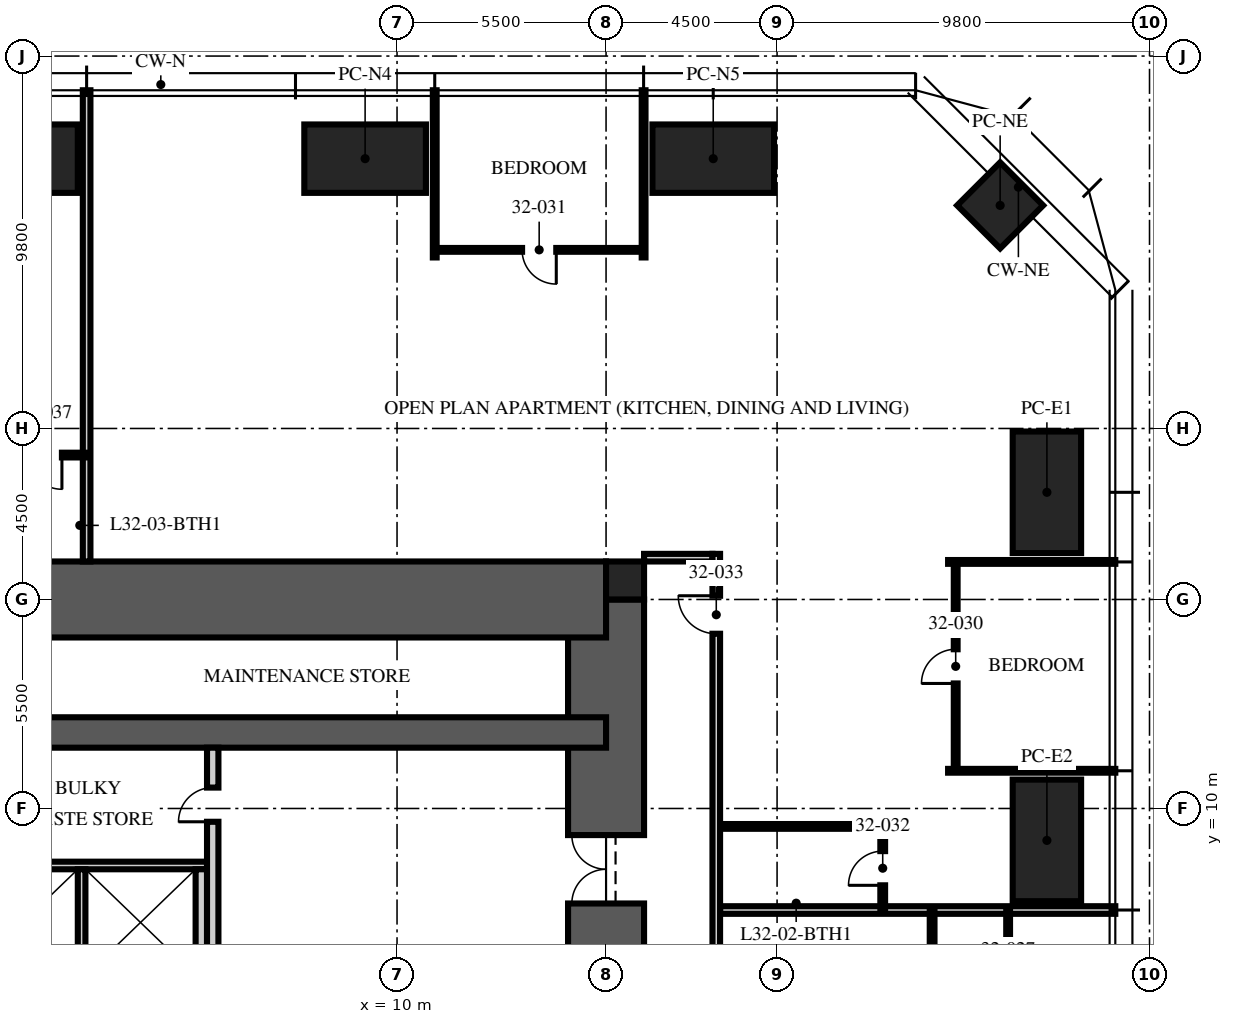
"""IFC4 building model, lengths in metres.
Left out: names, types, materials, properties, quantities, classifications, styles, units other than length and angle.
Written with IfcOpenShell. Run it as: python <this file> out.ifc"""

import sys

from ifc_helpers import new_model, si_unit, direction, frame, frame_2d, origin, origin_2d, place, context, subcontext, project, spatial, rectangle, extrude, element, fill, save


model = new_model("IFC4")
c1 = context("Model", 3, precision=1e-05, world=origin(), true_north=direction((0.0, 1.0)))
c2 = subcontext(c1, "Body", "Model", "MODEL_VIEW")
j1 = project(units=[si_unit("LENGTHUNIT", "METRE"), si_unit("PLANEANGLEUNIT", "RADIAN")], contexts=[c1])
p1 = place(None, origin())
s1 = spatial("IfcSite", under=j1, at=p1, CompositionType="ELEMENT")
p2 = place(p1, origin())
s2 = spatial("IfcBuilding", under=s1, at=p2, CompositionType="ELEMENT")
p3 = place(p2, frame((0.0, 0.0, 129.75)))
s3 = spatial("IfcBuildingStorey", under=s2, at=p3, CompositionType="ELEMENT", Elevation=129.75)
p4 = place(p3, frame((15.5, -15.5, -0.25), z_axis=(0.0, 0.0, 1.0), x_axis=(0.0, 1.0, 0.0)))
e1 = element("IfcWall", 1, at=p4, inside=s3, PredefinedType="SHEAR", context=c2, shape_type="SweptSolid", body=[
    extrude(rectangle(XDim=31.0, YDim=2.0, at=frame_2d((15.5, 0.0))), origin(), (0.0, 0.0, 1.0), 3.75),
])
p5 = place(p4, frame((6.5, 0.0, 0.25)))
e2 = element("IfcOpeningElement", 2, at=p5, cuts=e1, PredefinedType="OPENING", context=c2, shape_type="SweptSolid", body=[
    extrude(rectangle(XDim=1.2, YDim=2.1, at=frame_2d((0.6, 1.05))), frame((0.0, 1.01, 0.0), z_axis=(0.0, -1.0, 0.0), x_axis=(1.0, 0.0, 0.0)), (0.0, 0.0, 1.0), 2.02),
])
p6 = place(p4, frame((23.0, 0.0, 0.25)))
e3 = element("IfcOpeningElement", 3, at=p6, cuts=e1, PredefinedType="OPENING", context=c2, shape_type="SweptSolid", body=[
    extrude(rectangle(XDim=1.8, YDim=2.1, at=frame_2d((0.9, 1.05))), frame((0.0, 1.01, 0.0), z_axis=(0.0, -1.0, 0.0), x_axis=(1.0, 0.0, 0.0)), (0.0, 0.0, 1.0), 2.02),
])
p7 = place(p3, frame((-15.5, 15.5, -0.25), z_axis=(0.0, 0.0, 1.0), x_axis=(1.0, 0.0, 0.0)))
e4 = element("IfcWall", 4, at=p7, inside=s3, PredefinedType="SHEAR", context=c2, shape_type="SweptSolid", body=[
    extrude(rectangle(XDim=31.0, YDim=2.0, at=frame_2d((15.5, 0.0))), origin(), (0.0, 0.0, 1.0), 3.75),
])
p8 = place(p7, frame((5.0, 0.0, 0.25)))
e5 = element("IfcOpeningElement", 5, at=p8, cuts=e4, PredefinedType="OPENING", context=c2, shape_type="SweptSolid", body=[
    extrude(rectangle(XDim=1.0, YDim=2.1, at=frame_2d((0.5, 1.05))), frame((0.0, 1.01, 0.0), z_axis=(0.0, -1.0, 0.0), x_axis=(1.0, 0.0, 0.0)), (0.0, 0.0, 1.0), 2.02),
])
p9 = place(p3, frame((-15.5, 12.0, -0.25), z_axis=(0.0, 0.0, 1.0), x_axis=(1.0, 0.0, 0.0)))
e6 = element("IfcWall", 6, at=p9, inside=s3, PredefinedType="SHEAR", context=c2, shape_type="SweptSolid", body=[
    extrude(rectangle(XDim=31.0, YDim=0.8, at=frame_2d((15.5, 0.0))), origin(), (0.0, 0.0, 1.0), 3.75),
])
p10 = place(p3, frame((16.0, 16.0, -0.25), z_axis=(0.0, 0.0, 1.0), x_axis=(1.0, 0.0, 0.0)))
e7 = element("IfcColumn", 7, at=p10, inside=s3, PredefinedType="COLUMN", context=c2, shape_type="SweptSolid", body=[
    extrude(rectangle(XDim=1.0, YDim=1.0, at=origin_2d()), origin(), (0.0, 0.0, 1.0), 3.75),
])
for number, where, z_axis, x_axis in (
    (8, (0.0, 27.1, 0.0), (0.0, 0.0, 1.0), (1.0, 0.0, 0.0)),
    (9, (9.16, 27.1, 0.0), (0.0, 0.0, 1.0), (1.0, 0.0, 0.0)),
    (10, (18.32, 27.1, 0.0), (0.0, 0.0, 1.0), (1.0, 0.0, 0.0)),
    (11, (27.1, 18.32, 0.0), (0.0, 0.0, 1.0), (0.0, 1.0, 0.0)),
    (12, (27.1, 9.16, 0.0), (0.0, 0.0, 1.0), (0.0, 1.0, 0.0)),
):
    element("IfcColumn", number, at=place(p3, frame(where, z_axis=z_axis, x_axis=x_axis)), inside=s3, PredefinedType="COLUMN", context=c2, shape_type="SweptSolid", body=[
        extrude(rectangle(XDim=3.2, YDim=1.8, at=origin_2d()), origin(), (0.0, 0.0, 1.0), 3.75),
    ])
p11 = place(p3, frame((25.87, 25.87, 0.0), z_axis=(0.0, 0.0, 1.0), x_axis=(0.707106781187, -0.707106781187, 0.0)))
e13 = element("IfcColumn", 13, at=p11, inside=s3, PredefinedType="COLUMN", context=c2, shape_type="SweptSolid", body=[
    extrude(rectangle(XDim=1.6, YDim=1.6, at=origin_2d()), origin(), (0.0, 0.0, 1.0), 3.75),
])
p12 = place(p3, frame((-4.7, 8.5, 0.0), z_axis=(0.0, 0.0, 1.0), x_axis=(1.0, 0.0, 0.0)))
e14 = element("IfcWall", 14, at=p12, inside=s3, PredefinedType="PARTITIONING", context=c2, shape_type="SweptSolid", body=[
    extrude(rectangle(XDim=9.7, YDim=0.2, at=frame_2d((4.85, 0.0))), origin(), (0.0, 0.0, 1.0), 3.5),
])
p13 = place(p3, frame((4.85, 5.6, 0.0), z_axis=(0.0, 0.0, 1.0), x_axis=(0.0, 1.0, 0.0)))
e15 = element("IfcWall", 15, at=p13, inside=s3, PredefinedType="PARTITIONING", context=c2, shape_type="SweptSolid", body=[
    extrude(rectangle(XDim=2.8, YDim=0.3, at=frame_2d((1.4, 0.0))), origin(), (0.0, 0.0, 1.0), 3.5),
])
p14 = place(p3, frame((1.7, 5.6, 0.0), z_axis=(0.0, 0.0, 1.0), x_axis=(0.0, 1.0, 0.0)))
e16 = element("IfcWall", 16, at=p14, inside=s3, PredefinedType="PARTITIONING", context=c2, shape_type="SweptSolid", body=[
    extrude(rectangle(XDim=2.8, YDim=0.2, at=frame_2d((1.4, 0.0))), origin(), (0.0, 0.0, 1.0), 3.5),
])
p15 = place(p3, frame((5.15, 5.3, 0.0), z_axis=(0.0, 0.0, 1.0), x_axis=(0.0, 1.0, 0.0)))
e17 = element("IfcWall", 17, at=p15, inside=s3, PredefinedType="PARTITIONING", context=c2, shape_type="SweptSolid", body=[
    extrude(rectangle(XDim=6.3, YDim=0.3, at=frame_2d((3.15, 0.0))), origin(), (0.0, 0.0, 1.0), 3.5),
])
p16 = place(p15, frame((4.35, 0.0, 0.0)))
e18 = element("IfcOpeningElement", 18, at=p16, cuts=e17, PredefinedType="OPENING", context=c2, shape_type="SweptSolid", body=[
    extrude(rectangle(XDim=0.9, YDim=2.1, at=frame_2d((0.45, 1.05))), frame((0.0, 0.16, 0.0), z_axis=(0.0, -1.0, 0.0), x_axis=(1.0, 0.0, 0.0)), (0.0, 0.0, 1.0), 0.32),
])
p17 = place(p3, frame((16.5, 16.6, 0.0), z_axis=(0.0, 0.0, 1.0), x_axis=(1.0, 0.0, 0.0)))
e19 = element("IfcWall", 19, at=p17, inside=s3, PredefinedType="PARTITIONING", context=c2, shape_type="SweptSolid", body=[
    extrude(rectangle(XDim=1.8, YDim=0.2, at=frame_2d((0.9, 0.0))), origin(), (0.0, 0.0, 1.0), 2.3),
])
p18 = place(p3, frame((18.5, 7.328, 0.0), z_axis=(0.0, 0.0, 1.0), x_axis=(1.0, 0.0, 0.0)))
e20 = element("IfcWall", 20, at=p18, inside=s3, PredefinedType="PARTITIONING", context=c2, shape_type="SweptSolid", body=[
    extrude(rectangle(XDim=10.4, YDim=0.2, at=frame_2d((5.2, 0.0))), origin(), (0.0, 0.0, 1.0), 2.81),
])
for number, where, z_axis, x_axis in (
    (21, (24.5, 10.992, 0.0), (0.0, 0.0, 1.0), (1.0, 0.0, 0.0)),
    (22, (24.5, 16.488, 0.0), (0.0, 0.0, 1.0), (1.0, 0.0, 0.0)),
    (23, (16.488, 24.5, 0.0), (0.0, 0.0, 1.0), (0.0, 1.0, 0.0)),
    (24, (10.992, 24.5, 0.0), (0.0, 0.0, 1.0), (0.0, 1.0, 0.0)),
):
    element("IfcWall", number, at=place(p3, frame(where, z_axis=z_axis, x_axis=x_axis)), inside=s3, PredefinedType="PARTITIONING", context=c2, shape_type="SweptSolid", body=[
        extrude(rectangle(XDim=4.4, YDim=0.1, at=frame_2d((2.2, 0.0))), origin(), (0.0, 0.0, 1.0), 2.81),
    ])
p19 = place(p3, frame((1.832, 16.5, 0.0), z_axis=(0.0, 0.0, 1.0), x_axis=(0.0, 1.0, 0.0)))
e25 = element("IfcWall", 25, at=p19, inside=s3, PredefinedType="PARTITIONING", context=c2, shape_type="SweptSolid", body=[
    extrude(rectangle(XDim=12.4, YDim=0.2, at=frame_2d((6.2, 0.0))), origin(), (0.0, 0.0, 1.0), 2.81),
])
p20 = place(p3, frame((26.08, 1.832, 0.0), z_axis=(0.0, 0.0, 1.0), x_axis=(0.0, 1.0, 0.0)))
e26 = element("IfcWall", 26, at=p20, inside=s3, PredefinedType="PARTITIONING", context=c2, shape_type="SweptSolid", body=[
    extrude(rectangle(XDim=5.496, YDim=0.1, at=frame_2d((2.748, 0.0))), origin(), (0.0, 0.0, 1.0), 2.81),
])
p21 = place(p20, frame((0.15, 0.0, 0.0)))
e27 = element("IfcOpeningElement", 27, at=p21, cuts=e26, PredefinedType="OPENING", context=c2, shape_type="SweptSolid", body=[
    extrude(rectangle(XDim=0.9, YDim=2.1, at=frame_2d((0.45, 1.05))), frame((0.0, 0.06, 0.0), z_axis=(0.0, -1.0, 0.0), x_axis=(1.0, 0.0, 0.0)), (0.0, 0.0, 1.0), 0.12),
])
p22 = place(p20, frame((2.898, 0.0, 0.0)))
e28 = element("IfcOpeningElement", 28, at=p22, cuts=e26, PredefinedType="OPENING", context=c2, shape_type="SweptSolid", body=[
    extrude(rectangle(XDim=0.9, YDim=2.1, at=frame_2d((0.45, 1.05))), frame((0.0, 0.06, 0.0), z_axis=(0.0, -1.0, 0.0), x_axis=(1.0, 0.0, 0.0)), (0.0, 0.0, 1.0), 0.12),
])
p23 = place(p3, frame((24.08, 3.032, 0.0), z_axis=(0.0, 0.0, 1.0), x_axis=(0.0, 1.0, 0.0)))
e29 = element("IfcWall", 29, at=p23, inside=s3, PredefinedType="PARTITIONING", context=c2, shape_type="SweptSolid", body=[
    extrude(rectangle(XDim=4.296, YDim=0.125, at=frame_2d((2.148, 0.0))), origin(), (0.0, 0.0, 1.0), 2.81),
])
p24 = place(p3, frame((24.7, 10.992, 0.0), z_axis=(0.0, 0.0, 1.0), x_axis=(0.0, 1.0, 0.0)))
e30 = element("IfcWall", 30, at=p24, inside=s3, PredefinedType="PARTITIONING", context=c2, shape_type="SweptSolid", body=[
    extrude(rectangle(XDim=5.496, YDim=0.1, at=frame_2d((2.748, 0.0))), origin(), (0.0, 0.0, 1.0), 2.81),
])
p25 = place(p24, frame((2.298, 0.0, 0.0)))
e31 = element("IfcOpeningElement", 31, at=p25, cuts=e30, PredefinedType="OPENING", context=c2, shape_type="SweptSolid", body=[
    extrude(rectangle(XDim=0.9, YDim=2.1, at=frame_2d((0.45, 1.05))), frame((0.0, 0.06, 0.0), z_axis=(0.0, -1.0, 0.0), x_axis=(1.0, 0.0, 0.0)), (0.0, 0.0, 1.0), 0.12),
])
p26 = place(p3, frame((16.488, 24.7, 0.0), z_axis=(0.0, 0.0, 1.0), x_axis=(-1.0, 0.0, 0.0)))
e32 = element("IfcWall", 32, at=p26, inside=s3, PredefinedType="PARTITIONING", context=c2, shape_type="SweptSolid", body=[
    extrude(rectangle(XDim=5.496, YDim=0.1, at=frame_2d((2.748, 0.0))), origin(), (0.0, 0.0, 1.0), 2.81),
])
p27 = place(p26, frame((2.298, 0.0, 0.0)))
e33 = element("IfcOpeningElement", 33, at=p27, cuts=e32, PredefinedType="OPENING", context=c2, shape_type="SweptSolid", body=[
    extrude(rectangle(XDim=0.9, YDim=2.1, at=frame_2d((0.45, 1.05))), frame((0.0, 0.06, 0.0), z_axis=(0.0, -1.0, 0.0), x_axis=(1.0, 0.0, 0.0)), (0.0, 0.0, 1.0), 0.12),
])
p28 = place(p3, frame((22.78, 7.328, 0.0), z_axis=(0.0, 0.0, 1.0), x_axis=(0.0, 1.0, 0.0)))
e34 = element("IfcWall", 34, at=p28, inside=s3, PredefinedType="PARTITIONING", context=c2, shape_type="SweptSolid", body=[
    extrude(rectangle(XDim=2.2, YDim=0.125, at=frame_2d((1.1, 0.0))), origin(), (0.0, 0.0, 1.0), 2.7),
])
p29 = place(p28, frame((0.65, 0.0, 0.0)))
e35 = element("IfcOpeningElement", 35, at=p29, cuts=e34, PredefinedType="OPENING", context=c2, shape_type="SweptSolid", body=[
    extrude(rectangle(XDim=0.9, YDim=2.1, at=frame_2d((0.45, 1.05))), frame((0.0, 0.073, 0.0), z_axis=(0.0, -1.0, 0.0), x_axis=(1.0, 0.0, 0.0)), (0.0, 0.0, 1.0), 0.145),
])
p30 = place(p3, frame((18.5, 9.528, 0.0), z_axis=(0.0, 0.0, 1.0), x_axis=(1.0, 0.0, 0.0)))
e36 = element("IfcWall", 36, at=p30, inside=s3, PredefinedType="PARTITIONING", context=c2, shape_type="SweptSolid", body=[
    extrude(rectangle(XDim=4.28, YDim=0.125, at=frame_2d((2.14, 0.0))), origin(), (0.0, 0.0, 1.0), 3.5),
])
p31 = place(p3, frame((1.832, 19.3, 0.0), z_axis=(0.0, 0.0, 1.0), x_axis=(-1.0, 0.0, 0.0)))
e37 = element("IfcWall", 37, at=p31, inside=s3, PredefinedType="PARTITIONING", context=c2, shape_type="SweptSolid", body=[
    extrude(rectangle(XDim=2.2, YDim=0.125, at=frame_2d((1.1, 0.0))), origin(), (0.0, 0.0, 1.0), 2.7),
])
p32 = place(p31, frame((0.65, 0.0, 0.0)))
e38 = element("IfcOpeningElement", 38, at=p32, cuts=e37, PredefinedType="OPENING", context=c2, shape_type="SweptSolid", body=[
    extrude(rectangle(XDim=0.9, YDim=2.1, at=frame_2d((0.45, 1.05))), frame((0.0, 0.073, 0.0), z_axis=(0.0, -1.0, 0.0), x_axis=(1.0, 0.0, 0.0)), (0.0, 0.0, 1.0), 0.145),
])
p33 = place(p3, frame((18.4, -5.328, 0.0), z_axis=(0.0, 0.0, 1.0), x_axis=(0.0, 1.0, 0.0)))
e39 = element("IfcWall", 39, at=p33, inside=s3, PredefinedType="PARTITIONING", context=c2, shape_type="SweptSolid", body=[
    extrude(rectangle(XDim=22.028, YDim=0.2, at=frame_2d((11.014, 0.0))), origin(), (0.0, 0.0, 1.0), 2.7),
])
p34 = place(p33, frame((19.926, 0.0, 0.0)))
e40 = element("IfcOpeningElement", 40, at=p34, cuts=e39, PredefinedType="OPENING", context=c2, shape_type="SweptSolid", body=[
    extrude(rectangle(XDim=1.0, YDim=2.2, at=frame_2d((0.5, 1.1))), frame((0.0, 0.11, 0.0), z_axis=(0.0, -1.0, 0.0), x_axis=(1.0, 0.0, 0.0)), (0.0, 0.0, 1.0), 0.22),
])
p35 = place(p6, origin())
e41 = element("IfcDoor", 41, at=p35, inside=s3, OperationType="DOUBLE_DOOR_SINGLE_SWING", PredefinedType="DOOR", context=c2, shape_type="SweptSolid", body=[
    extrude(rectangle(XDim=1.8, YDim=2.1, at=frame_2d((0.9, 1.05))), frame((0.0, 0.025, 0.0), z_axis=(0.0, -1.0, 0.0), x_axis=(1.0, 0.0, 0.0)), (0.0, 0.0, 1.0), 0.05),
])
fill(e3, e41)
p36 = place(p16, origin())
e42 = element("IfcDoor", 42, at=p36, inside=s3, OperationType="SINGLE_SWING_LEFT", PredefinedType="DOOR", context=c2, shape_type="SweptSolid", body=[
    extrude(rectangle(XDim=0.9, YDim=2.1, at=frame_2d((0.45, 1.05))), frame((0.0, 0.025, 0.0), z_axis=(0.0, -1.0, 0.0), x_axis=(1.0, 0.0, 0.0)), (0.0, 0.0, 1.0), 0.05),
])
fill(e18, e42)
p37 = place(p25, origin())
e43 = element("IfcDoor", 43, at=p37, inside=s3, OperationType="SINGLE_SWING_LEFT", PredefinedType="DOOR", context=c2, shape_type="SweptSolid", body=[
    extrude(rectangle(XDim=0.9, YDim=2.1, at=frame_2d((0.45, 1.05))), frame((0.0, 0.025, 0.0), z_axis=(0.0, -1.0, 0.0), x_axis=(1.0, 0.0, 0.0)), (0.0, 0.0, 1.0), 0.05),
])
fill(e31, e43)
p38 = place(p27, origin())
e44 = element("IfcDoor", 44, at=p38, inside=s3, OperationType="SINGLE_SWING_LEFT", PredefinedType="DOOR", context=c2, shape_type="SweptSolid", body=[
    extrude(rectangle(XDim=0.9, YDim=2.1, at=frame_2d((0.45, 1.05))), frame((0.0, 0.025, 0.0), z_axis=(0.0, -1.0, 0.0), x_axis=(1.0, 0.0, 0.0)), (0.0, 0.0, 1.0), 0.05),
])
fill(e33, e44)
p39 = place(p29, origin())
e45 = element("IfcDoor", 45, at=p39, inside=s3, OperationType="SINGLE_SWING_LEFT", PredefinedType="DOOR", context=c2, shape_type="SweptSolid", body=[
    extrude(rectangle(XDim=0.9, YDim=2.1, at=frame_2d((0.45, 1.05))), frame((0.0, 0.025, 0.0), z_axis=(0.0, -1.0, 0.0), x_axis=(1.0, 0.0, 0.0)), (0.0, 0.0, 1.0), 0.05),
])
fill(e35, e45)
p40 = place(p34, origin())
e46 = element("IfcDoor", 46, at=p40, inside=s3, OperationType="SINGLE_SWING_RIGHT", PredefinedType="DOOR", context=c2, shape_type="SweptSolid", body=[
    extrude(rectangle(XDim=1.0, YDim=2.2, at=frame_2d((0.5, 1.1))), frame((0.0, 0.025, 0.0), z_axis=(0.0, -1.0, 0.0), x_axis=(1.0, 0.0, 0.0)), (0.0, 0.0, 1.0), 0.05),
])
fill(e40, e46)
p41 = place(p32, origin())
e47 = element("IfcDoor", 47, at=p41, inside=s3, OperationType="SINGLE_SWING_LEFT", PredefinedType="DOOR", context=c2, shape_type="SweptSolid", body=[
    extrude(rectangle(XDim=0.9, YDim=2.1, at=frame_2d((0.45, 1.05))), frame((0.0, 0.025, 0.0), z_axis=(0.0, -1.0, 0.0), x_axis=(1.0, 0.0, 0.0)), (0.0, 0.0, 1.0), 0.05),
])
fill(e38, e47)
save(model, sys.argv[1])
